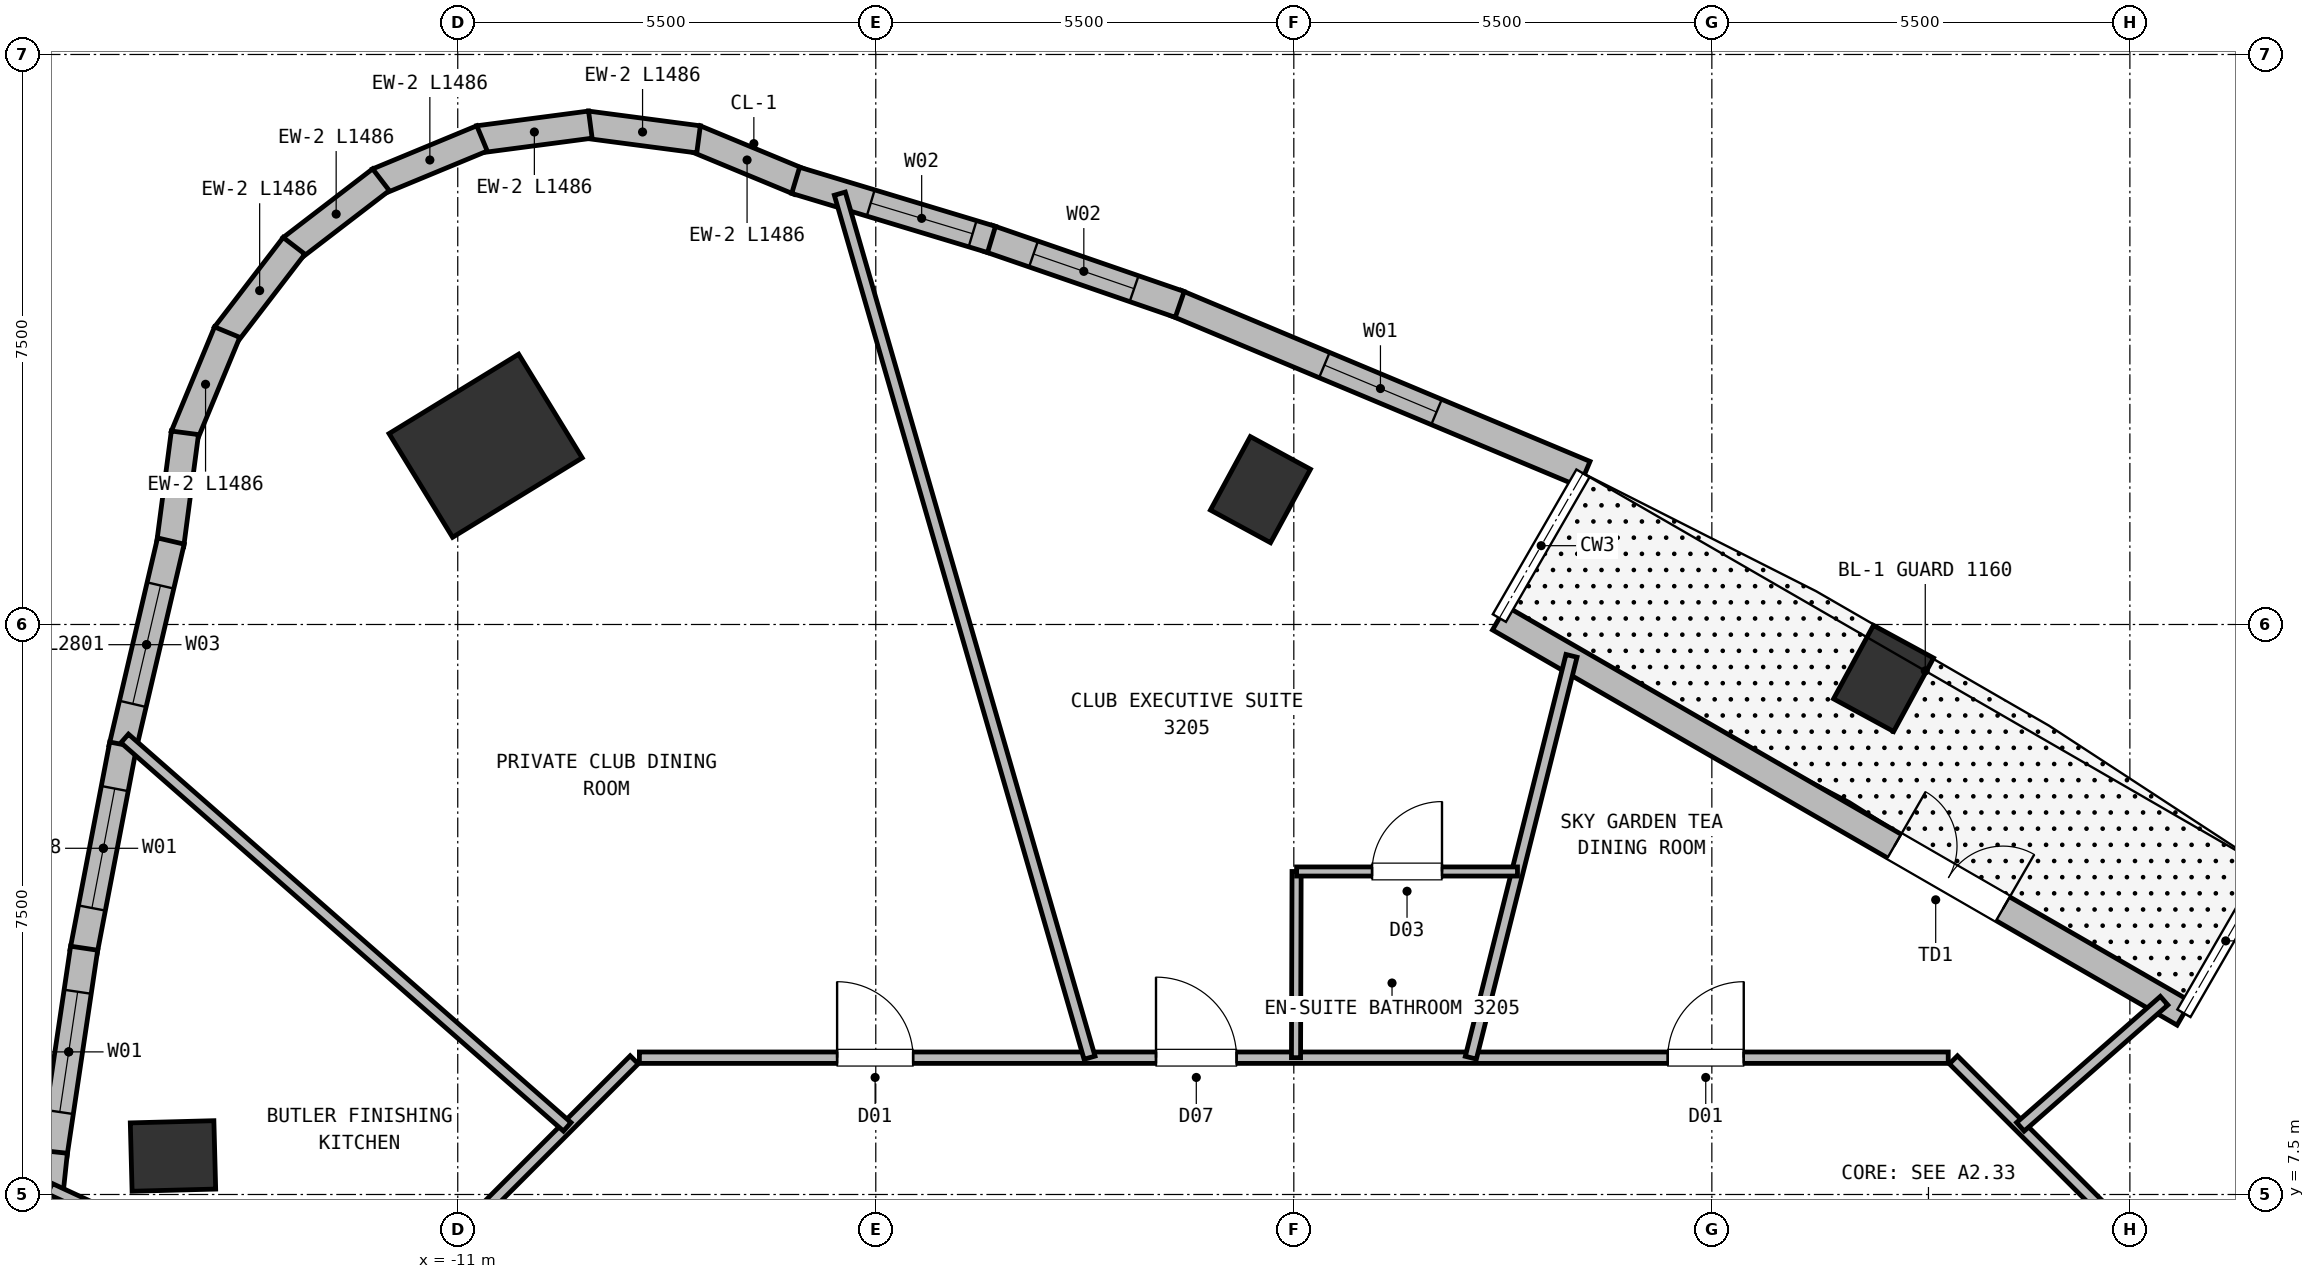
"""IFC4 building model, lengths in metres.
Left out: names, types, materials, properties, quantities, classifications, styles, units other than length and angle.
Written with IfcOpenShell. Run it as: python <this file> out.ifc"""

import sys

from ifc_helpers import new_model, si_unit, direction, frame, frame_2d, origin, origin_2d, place, context, subcontext, project, spatial, rectangle, extrude, element, fill, save


model = new_model("IFC4")
c1 = context("Model", 3, precision=1e-05, world=origin(), true_north=direction((0.0, 1.0)))
c2 = subcontext(c1, "Body", "Model", "MODEL_VIEW")
j1 = project(units=[si_unit("LENGTHUNIT", "METRE"), si_unit("PLANEANGLEUNIT", "RADIAN")], contexts=[c1])
p1 = place(None, origin())
s1 = spatial("IfcSite", under=j1, at=p1, CompositionType="ELEMENT")
p2 = place(p1, origin())
s2 = spatial("IfcBuilding", under=s1, at=p2, CompositionType="ELEMENT")
p3 = place(p2, frame((0.0, 0.0, 119.75)))
s3 = spatial("IfcBuildingStorey", under=s2, at=p3, CompositionType="ELEMENT", Elevation=119.75)
p4 = place(p3, frame((-10.633, 17.352, 0.0), z_axis=(0.0, 0.0, 1.0), x_axis=(-0.522498564716, 0.852640164354, 0.0)))
e1 = element("IfcColumn", 1, at=p4, inside=s3, PredefinedType="COLUMN", context=c2, shape_type="SweptSolid", body=[
    extrude(rectangle(XDim=1.6, YDim=2.0, at=origin_2d()), origin(), (0.0, 0.0, 1.0), 3.75),
])
for number, where, z_axis, x_axis in (
    (2, (-14.747, 8.007, 0.0), (0.0, 0.0, 1.0), (-0.026, 1.0, 0.0)),
    (3, (7.759, 14.29, 0.0), (0.0, 0.0, 1.0), (-0.879, 0.477, 0.0)),
    (4, (-0.439, 16.774, 0.0), (0.0, 0.0, 1.0), (-0.879, 0.477, 0.0)),
):
    element("IfcColumn", number, at=place(p3, frame(where, z_axis=z_axis, x_axis=x_axis)), inside=s3, PredefinedType="COLUMN", context=c2, shape_type="SweptSolid", body=[
        extrude(rectangle(XDim=0.9, YDim=1.1, at=origin_2d()), origin(), (0.0, 0.0, 1.0), 3.75),
    ])
p5 = place(p3, frame((2.705, 15.084, 0.0), z_axis=(0.0, 0.0, 1.0), x_axis=(0.866025696342, -0.499999493275, 0.0)))
e5 = element("IfcWall", 5, at=p5, inside=s3, PredefinedType="SOLIDWALL", context=c2, shape_type="SweptSolid", body=[
    extrude(rectangle(XDim=10.4, YDim=0.36, at=frame_2d((5.2, 0.0))), origin(), (0.0, 0.0, 1.0), 3.5),
])
p6 = place(p5, frame((6.0, 0.0, 0.0)))
e6 = element("IfcOpeningElement", 6, at=p6, cuts=e5, PredefinedType="OPENING", context=c2, shape_type="SweptSolid", body=[
    extrude(rectangle(XDim=1.65, YDim=2.25, at=frame_2d((0.825, 1.125))), frame((0.0, 0.19, 0.0), z_axis=(0.0, -1.0, 0.0), x_axis=(1.0, 0.0, 0.0)), (0.0, 0.0, 1.0), 0.38),
])
for number, where, z_axis, x_axis in (
    (7, (-7.88, 21.396, 0.0), (0.0, 0.0, 1.0), (0.924, -0.383, 0.0)),
    (8, (-9.305, 21.577, 0.0), (0.0, 0.0, 1.0), (0.991, -0.13, 0.0)),
    (9, (-10.729, 21.383, 0.0), (0.0, 0.0, 1.0), (0.991, 0.13, 0.0)),
):
    element("IfcWall", number, at=place(p3, frame(where, z_axis=z_axis, x_axis=x_axis)), inside=s3, PredefinedType="SOLIDWALL", context=c2, shape_type="SweptSolid", body=[
        extrude(rectangle(XDim=1.486, YDim=0.36, at=frame_2d((0.743, 0.0))), origin(), (0.0, 0.0, 1.0), 3.5),
    ])
p7 = place(p3, frame((-12.053, 20.827, 0.0), z_axis=(0.0, 0.0, 1.0), x_axis=(0.923862604215, 0.382724298331, 0.0)))
e10 = element("IfcWall", 10, at=p7, inside=s3, PredefinedType="SOLIDWALL", context=c2, shape_type="SweptSolid", body=[
    extrude(rectangle(XDim=1.486, YDim=0.36, at=frame_2d((0.743, 0.0))), origin(), (0.0, 0.0, 1.0), 3.5),
])
for number, where, z_axis, x_axis in (
    (11, (-13.189, 19.948, 0.0), (0.0, 0.0, 1.0), (0.793, 0.609, 0.0)),
    (12, (-14.059, 18.804, 0.0), (0.0, 0.0, 1.0), (0.609, 0.793, 0.0)),
):
    element("IfcWall", number, at=place(p3, frame(where, z_axis=z_axis, x_axis=x_axis)), inside=s3, PredefinedType="SOLIDWALL", context=c2, shape_type="SweptSolid", body=[
        extrude(rectangle(XDim=1.486, YDim=0.36, at=frame_2d((0.743, 0.0))), origin(), (0.0, 0.0, 1.0), 3.5),
    ])
p8 = place(p3, frame((-14.602, 17.474, 0.0), z_axis=(0.0, 0.0, 1.0), x_axis=(0.382724298331, 0.923862604215, 0.0)))
e13 = element("IfcWall", 13, at=p8, inside=s3, PredefinedType="SOLIDWALL", context=c2, shape_type="SweptSolid", body=[
    extrude(rectangle(XDim=1.486, YDim=0.36, at=frame_2d((0.743, 0.0))), origin(), (0.0, 0.0, 1.0), 3.5),
])
p9 = place(p3, frame((-14.783, 16.049, 0.0), z_axis=(0.0, 0.0, 1.0), x_axis=(0.130463013345, 0.991453176983, 0.0)))
e14 = element("IfcWall", 14, at=p9, inside=s3, PredefinedType="SOLIDWALL", context=c2, shape_type="SweptSolid", body=[
    extrude(rectangle(XDim=1.486, YDim=0.36, at=frame_2d((0.743, 0.0))), origin(), (0.0, 0.0, 1.0), 3.5),
])
p10 = place(p3, frame((-15.412, 13.371, 0.0), z_axis=(0.0, 0.0, 1.0), x_axis=(0.22776138749, 0.973716976523, 0.0)))
e15 = element("IfcWall", 15, at=p10, inside=s3, PredefinedType="SOLIDWALL", context=c2, shape_type="SweptSolid", body=[
    extrude(rectangle(XDim=2.801, YDim=0.36, at=frame_2d((1.4, 0.0))), origin(), (0.0, 0.0, 1.0), 3.5),
])
p11 = place(p10, frame((0.601, 0.0, 0.72)))
e16 = element("IfcOpeningElement", 16, at=p11, cuts=e15, PredefinedType="OPENING", context=c2, shape_type="SweptSolid", body=[
    extrude(rectangle(XDim=1.6, YDim=1.88, at=frame_2d((0.8, 0.94))), frame((0.0, 0.19, 0.0), z_axis=(0.0, -1.0, 0.0), x_axis=(1.0, 0.0, 0.0)), (0.0, 0.0, 1.0), 0.38),
])
p12 = place(p3, frame((-15.924, 10.691, 0.0), z_axis=(0.0, 0.0, 1.0), x_axis=(0.187911722621, 0.982185921555, 0.0)))
e17 = element("IfcWall", 17, at=p12, inside=s3, PredefinedType="SOLIDWALL", context=c2, shape_type="SweptSolid", body=[
    extrude(rectangle(XDim=2.778, YDim=0.36, at=frame_2d((1.389, 0.0))), origin(), (0.0, 0.0, 1.0), 3.5),
])
p13 = place(p12, frame((0.589, 0.0, 0.72)))
e18 = element("IfcOpeningElement", 18, at=p13, cuts=e17, PredefinedType="OPENING", context=c2, shape_type="SweptSolid", body=[
    extrude(rectangle(XDim=1.6, YDim=1.88, at=frame_2d((0.8, 0.94))), frame((0.0, 0.19, 0.0), z_axis=(0.0, -1.0, 0.0), x_axis=(1.0, 0.0, 0.0)), (0.0, 0.0, 1.0), 0.38),
])
p14 = place(p3, frame((-16.321, 8.012, 0.0), z_axis=(0.0, 0.0, 1.0), x_axis=(0.147193392227, 0.98910773189, 0.0)))
e19 = element("IfcWall", 19, at=p14, inside=s3, PredefinedType="SOLIDWALL", context=c2, shape_type="SweptSolid", body=[
    extrude(rectangle(XDim=2.758, YDim=0.36, at=frame_2d((1.379, 0.0))), origin(), (0.0, 0.0, 1.0), 3.5),
])
p15 = place(p14, frame((0.579, 0.0, 0.72)))
e20 = element("IfcOpeningElement", 20, at=p15, cuts=e19, PredefinedType="OPENING", context=c2, shape_type="SweptSolid", body=[
    extrude(rectangle(XDim=1.6, YDim=1.88, at=frame_2d((0.8, 0.94))), frame((0.0, 0.19, 0.0), z_axis=(0.0, -1.0, 0.0), x_axis=(1.0, 0.0, 0.0)), (0.0, 0.0, 1.0), 0.38),
])
p16 = place(p3, frame((-16.605, 5.333, 0.0), z_axis=(0.0, 0.0, 1.0), x_axis=(0.105606362296, 0.994408012962, 0.0)))
e21 = element("IfcWall", 21, at=p16, inside=s3, PredefinedType="SOLIDWALL", context=c2, shape_type="SweptSolid", body=[
    extrude(rectangle(XDim=2.744, YDim=0.36, at=frame_2d((1.372, 0.0))), origin(), (0.0, 0.0, 1.0), 3.5),
])
p17 = place(p16, frame((0.46, 0.0, 0.72)))
e22 = element("IfcOpeningElement", 22, at=p17, cuts=e21, PredefinedType="OPENING", context=c2, shape_type="SweptSolid", body=[
    extrude(rectangle(XDim=1.4, YDim=1.84, at=frame_2d((0.7, 0.92))), frame((0.0, 0.19, 0.0), z_axis=(0.0, -1.0, 0.0), x_axis=(1.0, 0.0, 0.0)), (0.0, 0.0, 1.0), 0.38),
])
p18 = place(p3, frame((-1.548, 19.229, 0.0), z_axis=(0.0, 0.0, 1.0), x_axis=(0.922477078981, -0.386051860187, 0.0)))
e23 = element("IfcWall", 23, at=p18, inside=s3, PredefinedType="SOLIDWALL", context=c2, shape_type="SweptSolid", body=[
    extrude(rectangle(XDim=5.827, YDim=0.36, at=frame_2d((2.914, 0.0))), origin(), (0.0, 0.0, 1.0), 3.5),
])
p19 = place(p18, frame((2.113, 0.0, 0.72)))
e24 = element("IfcOpeningElement", 24, at=p19, cuts=e23, PredefinedType="OPENING", context=c2, shape_type="SweptSolid", body=[
    extrude(rectangle(XDim=1.6, YDim=1.88, at=frame_2d((0.8, 0.94))), frame((0.0, 0.19, 0.0), z_axis=(0.0, -1.0, 0.0), x_axis=(1.0, 0.0, 0.0)), (0.0, 0.0, 1.0), 0.38),
])
p20 = place(p3, frame((-4.025, 20.082, 0.0), z_axis=(0.0, 0.0, 1.0), x_axis=(0.945339936715, -0.326086497807, 0.0)))
e25 = element("IfcWall", 25, at=p20, inside=s3, PredefinedType="SOLIDWALL", context=c2, shape_type="SweptSolid", body=[
    extrude(rectangle(XDim=2.67, YDim=0.36, at=frame_2d((1.335, 0.0))), origin(), (0.0, 0.0, 1.0), 3.5),
])
p21 = place(p20, frame((0.635, 0.0, 0.72)))
e26 = element("IfcOpeningElement", 26, at=p21, cuts=e25, PredefinedType="OPENING", context=c2, shape_type="SweptSolid", body=[
    extrude(rectangle(XDim=1.4, YDim=1.84, at=frame_2d((0.7, 0.92))), frame((0.0, 0.19, 0.0), z_axis=(0.0, -1.0, 0.0), x_axis=(1.0, 0.0, 0.0)), (0.0, 0.0, 1.0), 0.38),
])
p22 = place(p3, frame((-6.554, 20.844, 0.0), z_axis=(0.0, 0.0, 1.0), x_axis=(0.95736321508, -0.288886957843, 0.0)))
e27 = element("IfcWall", 27, at=p22, inside=s3, PredefinedType="SOLIDWALL", context=c2, shape_type="SweptSolid", body=[
    extrude(rectangle(XDim=2.692, YDim=0.36, at=frame_2d((1.346, 0.0))), origin(), (0.0, 0.0, 1.0), 3.5),
])
p23 = place(p22, frame((1.032, 0.0, 0.72)))
e28 = element("IfcOpeningElement", 28, at=p23, cuts=e27, PredefinedType="OPENING", context=c2, shape_type="SweptSolid", body=[
    extrude(rectangle(XDim=1.4, YDim=1.84, at=frame_2d((0.7, 0.92))), frame((0.0, 0.19, 0.0), z_axis=(0.0, -1.0, 0.0), x_axis=(1.0, 0.0, 0.0)), (0.0, 0.0, 1.0), 0.38),
])
p24 = place(p3, frame((8.678, 9.272, 0.0), z_axis=(0.0, 0.0, 1.0), x_axis=(0.707106781187, -0.707106781187, 0.0)))
e29 = element("IfcWall", 29, at=p24, inside=s3, PredefinedType="PARTITIONING", context=c2, shape_type="SweptSolid", body=[
    extrude(rectangle(XDim=2.89, YDim=0.15, at=frame_2d((1.445, 0.0))), origin(), (0.0, 0.0, 1.0), 3.5),
])
p25 = place(p3, frame((-8.61, 9.3, 0.0), z_axis=(0.0, 0.0, 1.0), x_axis=(1.0, 0.0, 0.0)))
e30 = element("IfcWall", 30, at=p25, inside=s3, PredefinedType="PARTITIONING", context=c2, shape_type="SweptSolid", body=[
    extrude(rectangle(XDim=17.22, YDim=0.15, at=frame_2d((8.61, 0.0))), origin(), (0.0, 0.0, 1.0), 3.5),
])
p26 = place(p25, frame((13.53, 0.0, 0.0)))
e31 = element("IfcOpeningElement", 31, at=p26, cuts=e30, PredefinedType="OPENING", context=c2, shape_type="SweptSolid", body=[
    extrude(rectangle(XDim=1.0, YDim=2.15, at=frame_2d((0.5, 1.075))), frame((0.0, 0.085, 0.0), z_axis=(0.0, -1.0, 0.0), x_axis=(1.0, 0.0, 0.0)), (0.0, 0.0, 1.0), 0.17),
])
p27 = place(p25, frame((6.797, 0.0, 0.0)))
e32 = element("IfcOpeningElement", 32, at=p27, cuts=e30, PredefinedType="OPENING", context=c2, shape_type="SweptSolid", body=[
    extrude(rectangle(XDim=1.06, YDim=2.15, at=frame_2d((0.53, 1.075))), frame((0.0, 0.085, 0.0), z_axis=(0.0, -1.0, 0.0), x_axis=(1.0, 0.0, 0.0)), (0.0, 0.0, 1.0), 0.17),
])
p28 = place(p25, frame((2.601, 0.0, 0.0)))
e33 = element("IfcOpeningElement", 33, at=p28, cuts=e30, PredefinedType="OPENING", context=c2, shape_type="SweptSolid", body=[
    extrude(rectangle(XDim=1.0, YDim=2.15, at=frame_2d((0.5, 1.075))), frame((0.0, 0.085, 0.0), z_axis=(0.0, -1.0, 0.0), x_axis=(1.0, 0.0, 0.0)), (0.0, 0.0, 1.0), 0.17),
])
p29 = place(p3, frame((-10.722, 7.228, 0.0), z_axis=(0.0, 0.0, 1.0), x_axis=(0.707106781187, 0.707106781187, 0.0)))
e34 = element("IfcWall", 34, at=p29, inside=s3, PredefinedType="PARTITIONING", context=c2, shape_type="SweptSolid", body=[
    extrude(rectangle(XDim=2.89, YDim=0.15, at=frame_2d((1.445, 0.0))), origin(), (0.0, 0.0, 1.0), 3.5),
])
p30 = place(p3, frame((9.56, 8.39, 0.0), z_axis=(0.0, 0.0, 1.0), x_axis=(0.751523551738, 0.659706261289, 0.0)))
e35 = element("IfcWall", 35, at=p30, inside=s3, PredefinedType="PARTITIONING", context=c2, shape_type="SweptSolid", body=[
    extrude(rectangle(XDim=2.515, YDim=0.15, at=frame_2d((1.258, 0.0))), origin(), (0.0, 0.0, 1.0), 3.5),
])
p31 = place(p3, frame((2.329, 9.3, 0.0), z_axis=(0.0, 0.0, 1.0), x_axis=(0.242946626974, 0.970039657149, 0.0)))
e36 = element("IfcWall", 36, at=p31, inside=s3, PredefinedType="PARTITIONING", context=c2, shape_type="SweptSolid", body=[
    extrude(rectangle(XDim=5.451, YDim=0.15, at=frame_2d((2.725, 0.0))), origin(), (0.0, 0.0, 1.0), 3.5),
])
p32 = place(p3, frame((0.029, 9.3, 0.0), z_axis=(0.0, 0.0, 1.0), x_axis=(0.00318882285, 0.999994915691, 0.0)))
e37 = element("IfcWall", 37, at=p32, inside=s3, PredefinedType="PARTITIONING", context=c2, shape_type="SweptSolid", body=[
    extrude(rectangle(XDim=2.45, YDim=0.12, at=frame_2d((1.225, 0.0))), origin(), (0.0, 0.0, 1.0), 3.5),
])
p33 = place(p3, frame((0.037, 11.75, 0.0), z_axis=(0.0, 0.0, 1.0), x_axis=(1.0, 0.0, 0.0)))
e38 = element("IfcWall", 38, at=p33, inside=s3, PredefinedType="PARTITIONING", context=c2, shape_type="SweptSolid", body=[
    extrude(rectangle(XDim=2.906, YDim=0.12, at=frame_2d((1.453, 0.0))), origin(), (0.0, 0.0, 1.0), 3.5),
])
p34 = place(p33, frame((0.993, 0.0, 0.0)))
e39 = element("IfcOpeningElement", 39, at=p34, cuts=e38, PredefinedType="OPENING", context=c2, shape_type="SweptSolid", body=[
    extrude(rectangle(XDim=0.92, YDim=2.1, at=frame_2d((0.46, 1.05))), frame((0.0, 0.07, 0.0), z_axis=(0.0, -1.0, 0.0), x_axis=(1.0, 0.0, 0.0)), (0.0, 0.0, 1.0), 0.14),
])
p35 = place(p3, frame((-2.688, 9.3, 0.0), z_axis=(0.0, 0.0, 1.0), x_axis=(-0.277627242784, 0.960688874748, 0.0)))
e40 = element("IfcWall", 40, at=p35, inside=s3, PredefinedType="PARTITIONING", context=c2, shape_type="SweptSolid", body=[
    extrude(rectangle(XDim=11.834, YDim=0.15, at=frame_2d((5.917, 0.0))), origin(), (0.0, 0.0, 1.0), 3.5),
])
p36 = place(p3, frame((-9.56, 8.39, 0.0), z_axis=(0.0, 0.0, 1.0), x_axis=(-0.751560639242, 0.659664009586, 0.0)))
e41 = element("IfcWall", 41, at=p36, inside=s3, PredefinedType="PARTITIONING", context=c2, shape_type="SweptSolid", body=[
    extrude(rectangle(XDim=7.747, YDim=0.15, at=frame_2d((3.874, 0.0))), origin(), (0.0, 0.0, 1.0), 3.5),
])
p37 = place(p3, frame((-10.75, 4.977, 0.0), z_axis=(0.0, 0.0, 1.0), x_axis=(-0.907495868458, 0.420061005964, 0.0)))
e42 = element("IfcWall", 42, at=p37, inside=s3, PredefinedType="PARTITIONING", context=c2, shape_type="SweptSolid", body=[
    extrude(rectangle(XDim=6.189, YDim=0.15, at=frame_2d((3.095, 0.0))), origin(), (0.0, 0.0, 1.0), 3.5),
])
p38 = place(p6, origin())
e43 = element("IfcDoor", 43, at=p38, inside=s3, OperationType="DOUBLE_DOOR_SINGLE_SWING", PredefinedType="DOOR", context=c2, shape_type="SweptSolid", body=[
    extrude(rectangle(XDim=1.65, YDim=2.25, at=frame_2d((0.825, 1.125))), frame((0.0, 0.025, 0.0), z_axis=(0.0, -1.0, 0.0), x_axis=(1.0, 0.0, 0.0)), (0.0, 0.0, 1.0), 0.05),
])
fill(e6, e43)
p39 = place(p11, origin())
e44 = element("IfcWindow", 44, at=p39, inside=s3, PartitioningType="SINGLE_PANEL", PredefinedType="WINDOW", context=c2, shape_type="SweptSolid", body=[
    extrude(rectangle(XDim=1.6, YDim=1.88, at=frame_2d((0.8, 0.94))), frame((0.0, 0.03, 0.0), z_axis=(0.0, -1.0, 0.0), x_axis=(1.0, 0.0, 0.0)), (0.0, 0.0, 1.0), 0.06),
])
fill(e16, e44)
p40 = place(p13, origin())
e45 = element("IfcWindow", 45, at=p40, inside=s3, PartitioningType="SINGLE_PANEL", PredefinedType="WINDOW", context=c2, shape_type="SweptSolid", body=[
    extrude(rectangle(XDim=1.6, YDim=1.88, at=frame_2d((0.8, 0.94))), frame((0.0, 0.03, 0.0), z_axis=(0.0, -1.0, 0.0), x_axis=(1.0, 0.0, 0.0)), (0.0, 0.0, 1.0), 0.06),
])
fill(e18, e45)
p41 = place(p15, origin())
e46 = element("IfcWindow", 46, at=p41, inside=s3, PartitioningType="SINGLE_PANEL", PredefinedType="WINDOW", context=c2, shape_type="SweptSolid", body=[
    extrude(rectangle(XDim=1.6, YDim=1.88, at=frame_2d((0.8, 0.94))), frame((0.0, 0.03, 0.0), z_axis=(0.0, -1.0, 0.0), x_axis=(1.0, 0.0, 0.0)), (0.0, 0.0, 1.0), 0.06),
])
fill(e20, e46)
p42 = place(p19, origin())
e47 = element("IfcWindow", 47, at=p42, inside=s3, PartitioningType="SINGLE_PANEL", PredefinedType="WINDOW", context=c2, shape_type="SweptSolid", body=[
    extrude(rectangle(XDim=1.6, YDim=1.88, at=frame_2d((0.8, 0.94))), frame((0.0, 0.03, 0.0), z_axis=(0.0, -1.0, 0.0), x_axis=(1.0, 0.0, 0.0)), (0.0, 0.0, 1.0), 0.06),
])
fill(e24, e47)
p43 = place(p21, origin())
e48 = element("IfcWindow", 48, at=p43, inside=s3, PartitioningType="SINGLE_PANEL", PredefinedType="WINDOW", context=c2, shape_type="SweptSolid", body=[
    extrude(rectangle(XDim=1.4, YDim=1.84, at=frame_2d((0.7, 0.92))), frame((0.0, 0.03, 0.0), z_axis=(0.0, -1.0, 0.0), x_axis=(1.0, 0.0, 0.0)), (0.0, 0.0, 1.0), 0.06),
])
fill(e26, e48)
p44 = place(p23, origin())
e49 = element("IfcWindow", 49, at=p44, inside=s3, PartitioningType="SINGLE_PANEL", PredefinedType="WINDOW", context=c2, shape_type="SweptSolid", body=[
    extrude(rectangle(XDim=1.4, YDim=1.84, at=frame_2d((0.7, 0.92))), frame((0.0, 0.03, 0.0), z_axis=(0.0, -1.0, 0.0), x_axis=(1.0, 0.0, 0.0)), (0.0, 0.0, 1.0), 0.06),
])
fill(e28, e49)
p45 = place(p34, origin())
e50 = element("IfcDoor", 50, at=p45, inside=s3, OperationType="SINGLE_SWING_RIGHT", PredefinedType="DOOR", context=c2, shape_type="SweptSolid", body=[
    extrude(rectangle(XDim=0.92, YDim=2.1, at=frame_2d((0.46, 1.05))), frame((0.0, 0.025, 0.0), z_axis=(0.0, -1.0, 0.0), x_axis=(1.0, 0.0, 0.0)), (0.0, 0.0, 1.0), 0.05),
])
fill(e39, e50)
p46 = place(p26, origin())
e51 = element("IfcDoor", 51, at=p46, inside=s3, OperationType="SINGLE_SWING_RIGHT", PredefinedType="DOOR", context=c2, shape_type="SweptSolid", body=[
    extrude(rectangle(XDim=1.0, YDim=2.15, at=frame_2d((0.5, 1.075))), frame((0.0, 0.025, 0.0), z_axis=(0.0, -1.0, 0.0), x_axis=(1.0, 0.0, 0.0)), (0.0, 0.0, 1.0), 0.05),
])
fill(e31, e51)
p47 = place(p27, origin())
e52 = element("IfcDoor", 52, at=p47, inside=s3, OperationType="SINGLE_SWING_LEFT", PredefinedType="DOOR", context=c2, shape_type="SweptSolid", body=[
    extrude(rectangle(XDim=1.06, YDim=2.15, at=frame_2d((0.53, 1.075))), frame((0.0, 0.025, 0.0), z_axis=(0.0, -1.0, 0.0), x_axis=(1.0, 0.0, 0.0)), (0.0, 0.0, 1.0), 0.05),
])
fill(e32, e52)
p48 = place(p28, origin())
e53 = element("IfcDoor", 53, at=p48, inside=s3, OperationType="SINGLE_SWING_LEFT", PredefinedType="DOOR", context=c2, shape_type="SweptSolid", body=[
    extrude(rectangle(XDim=1.0, YDim=2.15, at=frame_2d((0.5, 1.075))), frame((0.0, 0.025, 0.0), z_axis=(0.0, -1.0, 0.0), x_axis=(1.0, 0.0, 0.0)), (0.0, 0.0, 1.0), 0.05),
])
fill(e33, e53)
save(model, sys.argv[1])
